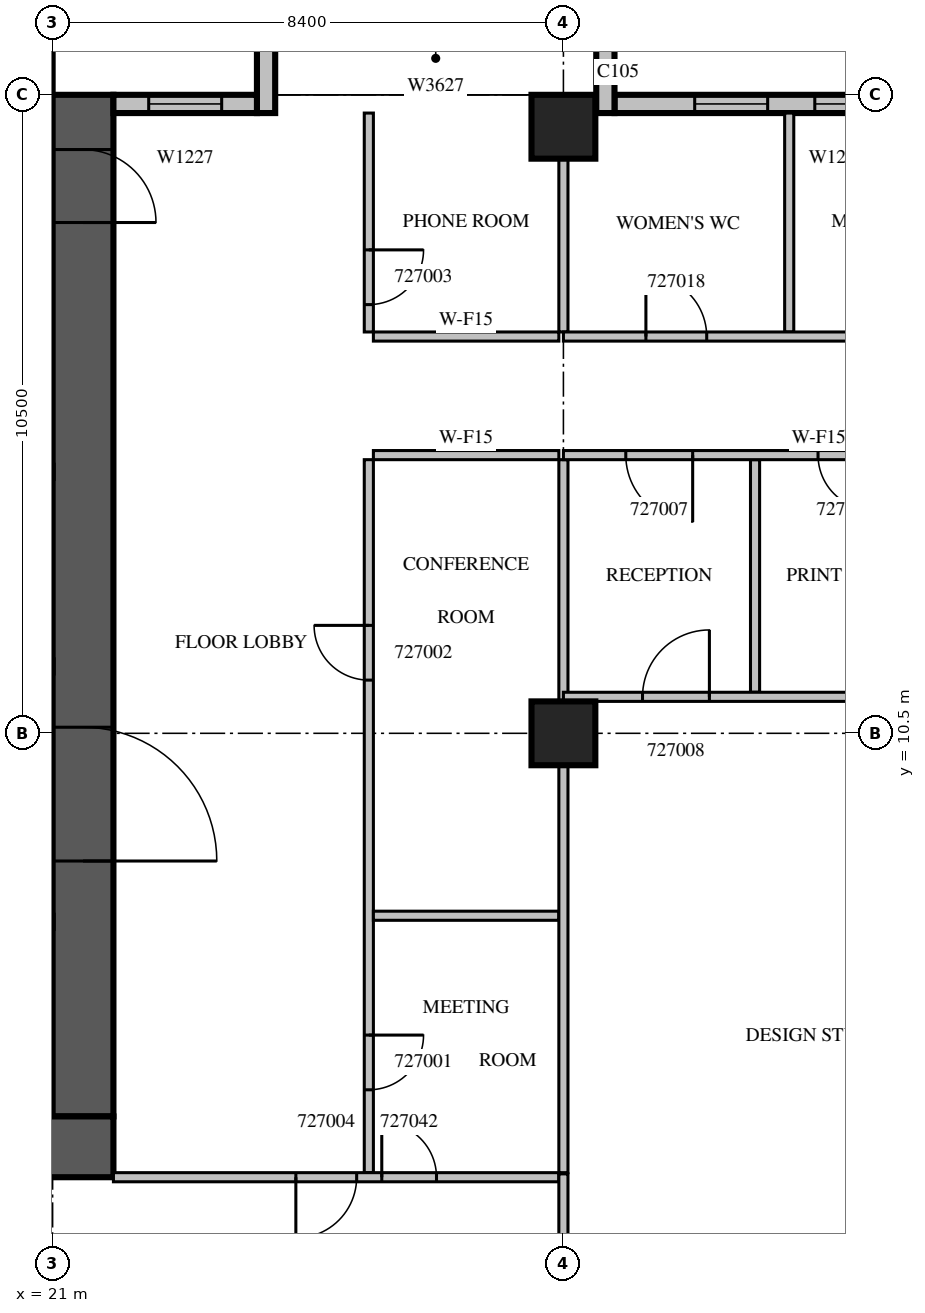
"""IFC4 building model, lengths in metres.
Left out: names, types, materials, properties, quantities, classifications, styles, units other than length and angle.
Written with IfcOpenShell. Run it as: python <this file> out.ifc"""

import sys

from ifc_helpers import new_model, si_unit, direction, frame, frame_2d, origin, origin_2d, place, context, subcontext, project, spatial, rectangle, extrude, source, transform, mapped, element, fill, save


model = new_model("IFC4")
c1 = context("Model", 3, precision=1e-05, world=origin(), true_north=direction((0.0, 1.0)))
c2 = subcontext(c1, "Body", "Model", "MODEL_VIEW")
j1 = project(units=[si_unit("LENGTHUNIT", "METRE"), si_unit("PLANEANGLEUNIT", "RADIAN")], contexts=[c1])
p1 = place(None, origin())
s1 = spatial("IfcSite", under=j1, at=p1, CompositionType="ELEMENT")
p2 = place(p1, origin())
s2 = spatial("IfcBuilding", under=s1, at=p2, CompositionType="ELEMENT")
p3 = place(p2, frame((0.0, 0.0, 124.5)))
s3 = spatial("IfcBuildingStorey", under=s2, at=p3, CompositionType="ELEMENT", Elevation=124.5)
m1 = source(origin(), c2, "Body", "SweptSolid", [
    extrude(rectangle(XDim=1.05, YDim=1.05, at=origin_2d()), origin(), (0.0, 0.0, 1.0), 4.2),
])
for number, where, z_axis, x_axis in (
    (1, (29.4, 10.5, 0.0), (0.0, 0.0, 1.0), (1.0, 0.0, 0.0)),
    (2, (29.4, 20.475, 0.0), (0.0, 0.0, 1.0), (1.0, 0.0, 0.0)),
):
    element("IfcColumn", number, at=place(p3, frame(where, z_axis=z_axis, x_axis=x_axis)), inside=s3, PredefinedType="COLUMN", context=c2, shape_type="MappedRepresentation", body=[
        mapped(m1, transform((0.0, 0.0, 0.0), scale=1.0)),
    ])
m2 = source(origin(), c2, "Body", "SweptSolid", [
    extrude(rectangle(XDim=16.8, YDim=1.0, at=frame_2d((8.4, 0.0))), origin(), (0.0, 0.0, 1.0), 4.2),
])
p4 = place(p3, frame((21.5, 4.2, 0.0), z_axis=(0.0, 0.0, 1.0), x_axis=(0.0, 1.0, 0.0)))
e3 = element("IfcWall", 3, at=p4, inside=s3, PredefinedType="SHEAR", context=c2, shape_type="MappedRepresentation", body=[
    mapped(m2, transform((0.0, 0.0, 0.0), scale=1.0)),
])
m3 = source(origin(), c2, "Body", "SweptSolid", [
    extrude(rectangle(XDim=2.2, YDim=2.1, at=frame_2d((1.1, 1.05))), frame((0.0, 0.51, 0.0), z_axis=(0.0, -1.0, 0.0), x_axis=(1.0, 0.0, 0.0)), (0.0, 0.0, 1.0), 1.02),
])
p5 = place(p4, frame((4.2, 0.0, 0.0)))
e4 = element("IfcOpeningElement", 4, at=p5, cuts=e3, PredefinedType="OPENING", context=c2, shape_type="MappedRepresentation", body=[
    mapped(m3, transform((0.0, 0.0, 0.0), scale=1.0)),
])
m4 = source(origin(), c2, "Body", "SweptSolid", [
    extrude(rectangle(XDim=1.2, YDim=2.1, at=frame_2d((0.6, 1.05))), frame((0.0, 0.51, 0.0), z_axis=(0.0, -1.0, 0.0), x_axis=(1.0, 0.0, 0.0)), (0.0, 0.0, 1.0), 1.02),
])
p6 = place(p4, frame((14.7, 0.0, 0.0)))
e5 = element("IfcOpeningElement", 5, at=p6, cuts=e3, PredefinedType="OPENING", context=c2, shape_type="MappedRepresentation", body=[
    mapped(m4, transform((0.0, 0.0, 0.0), scale=1.0)),
])
m5 = source(origin(), c2, "Body", "SweptSolid", [
    extrude(rectangle(XDim=17.8, YDim=1.0, at=frame_2d((8.9, 0.0))), origin(), (0.0, 0.0, 1.0), 4.2),
])
p7 = place(p3, frame((4.2, 3.7, 0.0), z_axis=(0.0, 0.0, 1.0), x_axis=(1.0, 0.0, 0.0)))
e6 = element("IfcWall", 6, at=p7, inside=s3, PredefinedType="SHEAR", context=c2, shape_type="MappedRepresentation", body=[
    mapped(m5, transform((0.0, 0.0, 0.0), scale=1.0)),
])
m6 = source(origin(), c2, "Body", "SweptSolid", [
    extrude(rectangle(XDim=7.035, YDim=0.3, at=frame_2d((3.518, 0.0))), origin(), (0.0, 0.0, 1.0), 3.8),
])
p8 = place(p3, frame((37.275, 20.85, 0.0), z_axis=(0.0, 0.0, 1.0), x_axis=(-1.0, 0.0, 0.0)))
e7 = element("IfcWall", 7, at=p8, inside=s3, PredefinedType="STANDARD", context=c2, shape_type="MappedRepresentation", body=[
    mapped(m6, transform((0.0, 0.0, 0.0), scale=1.0)),
])
m7 = source(origin(), c2, "Body", "SweptSolid", [
    extrude(rectangle(XDim=1.2, YDim=2.7, at=frame_2d((0.6, 1.35))), frame((0.0, 0.16, 0.0), z_axis=(0.0, -1.0, 0.0), x_axis=(1.0, 0.0, 0.0)), (0.0, 0.0, 1.0), 0.32),
])
p9 = place(p8, frame((2.541, 0.0, 0.6)))
e8 = element("IfcOpeningElement", 8, at=p9, cuts=e7, PredefinedType="OPENING", context=c2, shape_type="MappedRepresentation", body=[
    mapped(m7, transform((0.0, 0.0, 0.0), scale=1.0)),
])
p10 = place(p8, frame((4.516, 0.0, 0.6)))
e9 = element("IfcOpeningElement", 9, at=p10, cuts=e7, PredefinedType="OPENING", context=c2, shape_type="MappedRepresentation", body=[
    mapped(m7, transform((0.0, 0.0, 0.0), scale=1.0)),
])
m8 = source(origin(), c2, "Body", "SweptSolid", [
    extrude(rectangle(XDim=1.2, YDim=0.3, at=frame_2d((0.6, 0.0))), origin(), (0.0, 0.0, 1.0), 3.8),
])
for number, where, z_axis, x_axis in (
    (10, (30.09, 20.7, 0.0), (0.0, 0.0, 1.0), (0.0, 1.0, 0.0)),
    (11, (24.51, 20.7, 0.0), (0.0, 0.0, 1.0), (0.0, 1.0, 0.0)),
):
    element("IfcWall", number, at=place(p3, frame(where, z_axis=z_axis, x_axis=x_axis)), inside=s3, PredefinedType="STANDARD", context=c2, shape_type="MappedRepresentation", body=[
        mapped(m8, transform((0.0, 0.0, 0.0), scale=1.0)),
    ])
m9 = source(origin(), c2, "Body", "SweptSolid", [
    extrude(rectangle(XDim=2.36, YDim=0.3, at=frame_2d((1.18, 0.0))), origin(), (0.0, 0.0, 1.0), 3.8),
])
p11 = place(p3, frame((24.36, 20.85, 0.0), z_axis=(0.0, 0.0, 1.0), x_axis=(-1.0, 0.0, 0.0)))
e12 = element("IfcWall", 12, at=p11, inside=s3, PredefinedType="STANDARD", context=c2, shape_type="MappedRepresentation", body=[
    mapped(m9, transform((0.0, 0.0, 0.0), scale=1.0)),
])
p12 = place(p11, frame((0.58, 0.0, 0.6)))
e13 = element("IfcOpeningElement", 13, at=p12, cuts=e12, PredefinedType="OPENING", context=c2, shape_type="MappedRepresentation", body=[
    mapped(m7, transform((0.0, 0.0, 0.0), scale=1.0)),
])
m10 = source(origin(), c2, "Body", "SweptSolid", [
    extrude(rectangle(XDim=11.725, YDim=0.15, at=frame_2d((5.862, 0.0))), origin(), (0.0, 0.0, 1.0), 3.8),
])
p13 = place(p3, frame((26.2, 15.0, 0.0), z_axis=(0.0, 0.0, 1.0), x_axis=(0.0, -1.0, 0.0)))
e14 = element("IfcWall", 14, at=p13, inside=s3, PredefinedType="PARTITIONING", context=c2, shape_type="MappedRepresentation", body=[
    mapped(m10, transform((0.0, 0.0, 0.0), scale=1.0)),
])
m11 = source(origin(), c2, "Body", "SweptSolid", [
    extrude(rectangle(XDim=0.9, YDim=2.1, at=frame_2d((0.45, 1.05))), frame((0.0, 0.085, 0.0), z_axis=(0.0, -1.0, 0.0), x_axis=(1.0, 0.0, 0.0)), (0.0, 0.0, 1.0), 0.17),
])
p14 = place(p13, frame((9.463, 0.0, 0.0)))
e15 = element("IfcOpeningElement", 15, at=p14, cuts=e14, PredefinedType="OPENING", context=c2, shape_type="MappedRepresentation", body=[
    mapped(m11, transform((0.0, 0.0, 0.0), scale=1.0)),
])
p15 = place(p13, frame((2.725, 0.0, 0.0)))
e16 = element("IfcOpeningElement", 16, at=p15, cuts=e14, PredefinedType="OPENING", context=c2, shape_type="MappedRepresentation", body=[
    mapped(m11, transform((0.0, 0.0, 0.0), scale=1.0)),
])
m12 = source(origin(), c2, "Body", "SweptSolid", [
    extrude(rectangle(XDim=3.6, YDim=0.15, at=frame_2d((1.8, 0.0))), origin(), (0.0, 0.0, 1.0), 3.8),
])
p16 = place(p3, frame((26.2, 20.7, 0.0), z_axis=(0.0, 0.0, 1.0), x_axis=(0.0, -1.0, 0.0)))
e17 = element("IfcWall", 17, at=p16, inside=s3, PredefinedType="PARTITIONING", context=c2, shape_type="MappedRepresentation", body=[
    mapped(m12, transform((0.0, 0.0, 0.0), scale=1.0)),
])
p17 = place(p16, frame((2.25, 0.0, 0.0)))
e18 = element("IfcOpeningElement", 18, at=p17, cuts=e17, PredefinedType="OPENING", context=c2, shape_type="MappedRepresentation", body=[
    mapped(m11, transform((0.0, 0.0, 0.0), scale=1.0)),
])
m13 = source(origin(), c2, "Body", "SweptSolid", [
    extrude(rectangle(XDim=3.05, YDim=0.15, at=frame_2d((1.525, 0.0))), origin(), (0.0, 0.0, 1.0), 3.8),
])
for number, where, z_axis, x_axis in (
    (19, (29.325, 7.5, 0.0), (0.0, 0.0, 1.0), (-1.0, 0.0, 0.0)),
    (20, (29.325, 15.075, 0.0), (0.0, 0.0, 1.0), (-1.0, 0.0, 0.0)),
    (21, (26.275, 17.025, 0.0), (0.0, 0.0, 1.0), (1.0, 0.0, 0.0)),
):
    element("IfcWall", number, at=place(p3, frame(where, z_axis=z_axis, x_axis=x_axis)), inside=s3, PredefinedType="PARTITIONING", context=c2, shape_type="MappedRepresentation", body=[
        mapped(m13, transform((0.0, 0.0, 0.0), scale=1.0)),
    ])
m14 = source(origin(), c2, "Body", "SweptSolid", [
    extrude(rectangle(XDim=6.701, YDim=0.15, at=frame_2d((3.35, 0.0))), origin(), (0.0, 0.0, 1.0), 3.8),
])
p18 = place(p3, frame((29.4, 3.275, 0.0), z_axis=(0.0, 0.0, 1.0), x_axis=(0.0, 1.0, 0.0)))
e22 = element("IfcWall", 22, at=p18, inside=s3, PredefinedType="PARTITIONING", context=c2, shape_type="MappedRepresentation", body=[
    mapped(m14, transform((0.0, 0.0, 0.0), scale=1.0)),
])
m15 = source(origin(), c2, "Body", "SweptSolid", [
    extrude(rectangle(XDim=3.976, YDim=0.15, at=frame_2d((1.988, 0.0))), origin(), (0.0, 0.0, 1.0), 3.8),
])
p19 = place(p3, frame((29.4, 11.024, 0.0), z_axis=(0.0, 0.0, 1.0), x_axis=(0.0, 1.0, 0.0)))
e23 = element("IfcWall", 23, at=p19, inside=s3, PredefinedType="PARTITIONING", context=c2, shape_type="MappedRepresentation", body=[
    mapped(m15, transform((0.0, 0.0, 0.0), scale=1.0)),
])
m16 = source(origin(), c2, "Body", "SweptSolid", [
    extrude(rectangle(XDim=2.851, YDim=0.15, at=frame_2d((1.425, 0.0))), origin(), (0.0, 0.0, 1.0), 3.8),
])
p20 = place(p3, frame((29.4, 17.1, 0.0), z_axis=(0.0, 0.0, 1.0), x_axis=(0.0, 1.0, 0.0)))
e24 = element("IfcWall", 24, at=p20, inside=s3, PredefinedType="PARTITIONING", context=c2, shape_type="MappedRepresentation", body=[
    mapped(m16, transform((0.0, 0.0, 0.0), scale=1.0)),
])
m17 = source(origin(), c2, "Body", "SweptSolid", [
    extrude(rectangle(XDim=7.325, YDim=0.15, at=frame_2d((3.663, 0.0))), origin(), (0.0, 0.0, 1.0), 3.8),
])
p21 = place(p3, frame((22.0, 3.2, 0.0), z_axis=(0.0, 0.0, 1.0), x_axis=(1.0, 0.0, 0.0)))
e25 = element("IfcWall", 25, at=p21, inside=s3, PredefinedType="PARTITIONING", context=c2, shape_type="MappedRepresentation", body=[
    mapped(m17, transform((0.0, 0.0, 0.0), scale=1.0)),
])
m18 = source(origin(), c2, "Body", "SweptSolid", [
    extrude(rectangle(XDim=1.0, YDim=2.1, at=frame_2d((0.5, 1.05))), frame((0.0, 0.085, 0.0), z_axis=(0.0, -1.0, 0.0), x_axis=(1.0, 0.0, 0.0)), (0.0, 0.0, 1.0), 0.17),
])
p22 = place(p21, frame((3.0, 0.0, 0.0)))
e26 = element("IfcOpeningElement", 26, at=p22, cuts=e25, PredefinedType="OPENING", context=c2, shape_type="MappedRepresentation", body=[
    mapped(m18, transform((0.0, 0.0, 0.0), scale=1.0)),
])
p23 = place(p21, frame((4.413, 0.0, 0.0)))
e27 = element("IfcOpeningElement", 27, at=p23, cuts=e25, PredefinedType="OPENING", context=c2, shape_type="MappedRepresentation", body=[
    mapped(m11, transform((0.0, 0.0, 0.0), scale=1.0)),
])
m19 = source(origin(), c2, "Body", "SweptSolid", [
    extrude(rectangle(XDim=3.825, YDim=0.15, at=frame_2d((1.913, 0.0))), origin(), (0.0, 0.0, 1.0), 3.8),
])
p24 = place(p3, frame((32.551, 11.175, 0.0), z_axis=(0.0, 0.0, 1.0), x_axis=(0.0, 1.0, 0.0)))
e28 = element("IfcWall", 28, at=p24, inside=s3, PredefinedType="PARTITIONING", context=c2, shape_type="MappedRepresentation", body=[
    mapped(m19, transform((0.0, 0.0, 0.0), scale=1.0)),
])
m20 = source(origin(), c2, "Body", "SweptSolid", [
    extrude(rectangle(XDim=2.206, YDim=0.15, at=frame_2d((1.103, 0.0))), origin(), (0.0, 0.0, 1.0), 3.8),
])
p25 = place(p3, frame((29.4, 1.049, 0.0), z_axis=(0.0, 0.0, 1.0), x_axis=(0.0, 1.0, 0.0)))
e29 = element("IfcWall", 29, at=p25, inside=s3, PredefinedType="PARTITIONING", context=c2, shape_type="MappedRepresentation", body=[
    mapped(m20, transform((0.0, 0.0, 0.0), scale=1.0)),
])
m21 = source(origin(), c2, "Body", "SweptSolid", [
    extrude(rectangle(XDim=8.4, YDim=0.15, at=frame_2d((4.2, 0.0))), origin(), (0.0, 0.0, 1.0), 3.8),
])
p26 = place(p3, frame((37.8, 11.1, 0.0), z_axis=(0.0, 0.0, 1.0), x_axis=(-1.0, 0.0, 0.0)))
e30 = element("IfcWall", 30, at=p26, inside=s3, PredefinedType="PARTITIONING", context=c2, shape_type="MappedRepresentation", body=[
    mapped(m21, transform((0.0, 0.0, 0.0), scale=1.0)),
])
m22 = source(origin(), c2, "Body", "SweptSolid", [
    extrude(rectangle(XDim=1.1, YDim=2.1, at=frame_2d((0.55, 1.05))), frame((0.0, 0.085, 0.0), z_axis=(0.0, -1.0, 0.0), x_axis=(1.0, 0.0, 0.0)), (0.0, 0.0, 1.0), 0.17),
])
p27 = place(p26, frame((5.999, 0.0, 0.0)))
e31 = element("IfcOpeningElement", 31, at=p27, cuts=e30, PredefinedType="OPENING", context=c2, shape_type="MappedRepresentation", body=[
    mapped(m22, transform((0.0, 0.0, 0.0), scale=1.0)),
])
p28 = place(p3, frame((33.113, 20.7, 0.0), z_axis=(0.0, 0.0, 1.0), x_axis=(0.0, -1.0, 0.0)))
e32 = element("IfcWall", 32, at=p28, inside=s3, PredefinedType="PARTITIONING", context=c2, shape_type="MappedRepresentation", body=[
    mapped(m12, transform((0.0, 0.0, 0.0), scale=1.0)),
])
p29 = place(p3, frame((37.8, 15.075, 0.0), z_axis=(0.0, 0.0, 1.0), x_axis=(-1.0, 0.0, 0.0)))
e33 = element("IfcWall", 33, at=p29, inside=s3, PredefinedType="PARTITIONING", context=c2, shape_type="MappedRepresentation", body=[
    mapped(m21, transform((0.0, 0.0, 0.0), scale=1.0)),
])
p30 = place(p29, frame((6.274, 0.0, 0.0)))
e34 = element("IfcOpeningElement", 34, at=p30, cuts=e33, PredefinedType="OPENING", context=c2, shape_type="MappedRepresentation", body=[
    mapped(m22, transform((0.0, 0.0, 0.0), scale=1.0)),
])
p31 = place(p29, frame((3.313, 0.0, 0.0)))
e35 = element("IfcOpeningElement", 35, at=p31, cuts=e33, PredefinedType="OPENING", context=c2, shape_type="MappedRepresentation", body=[
    mapped(m11, transform((0.0, 0.0, 0.0), scale=1.0)),
])
p32 = place(p29, frame((0.689, 0.0, 0.0)))
e36 = element("IfcOpeningElement", 36, at=p32, cuts=e33, PredefinedType="OPENING", context=c2, shape_type="MappedRepresentation", body=[
    mapped(m11, transform((0.0, 0.0, 0.0), scale=1.0)),
])
m23 = source(origin(), c2, "Body", "SweptSolid", [
    extrude(rectangle(XDim=37.5, YDim=0.15, at=frame_2d((18.75, 0.0))), origin(), (0.0, 0.0, 1.0), 3.8),
])
p33 = place(p3, frame((29.4, 17.025, 0.0), z_axis=(0.0, 0.0, 1.0), x_axis=(1.0, 0.0, 0.0)))
e37 = element("IfcWall", 37, at=p33, inside=s3, PredefinedType="PARTITIONING", context=c2, shape_type="MappedRepresentation", body=[
    mapped(m23, transform((0.0, 0.0, 0.0), scale=1.0)),
])
p34 = place(p33, frame((1.357, 0.0, 0.0)))
e38 = element("IfcOpeningElement", 38, at=p34, cuts=e37, PredefinedType="OPENING", context=c2, shape_type="MappedRepresentation", body=[
    mapped(m18, transform((0.0, 0.0, 0.0), scale=1.0)),
])
p35 = place(p33, frame((4.669, 0.0, 0.0)))
e39 = element("IfcOpeningElement", 39, at=p35, cuts=e37, PredefinedType="OPENING", context=c2, shape_type="MappedRepresentation", body=[
    mapped(m18, transform((0.0, 0.0, 0.0), scale=1.0)),
])
p36 = place(p33, frame((7.012, 0.0, 0.0)))
e40 = element("IfcOpeningElement", 40, at=p36, cuts=e37, PredefinedType="OPENING", context=c2, shape_type="MappedRepresentation", body=[
    mapped(m18, transform((0.0, 0.0, 0.0), scale=1.0)),
])
p37 = place(p33, frame((10.342, 0.0, 0.0)))
e41 = element("IfcOpeningElement", 41, at=p37, cuts=e37, PredefinedType="OPENING", context=c2, shape_type="MappedRepresentation", body=[
    mapped(m11, transform((0.0, 0.0, 0.0), scale=1.0)),
])
p38 = place(p33, frame((15.09, 0.0, 0.0)))
e42 = element("IfcOpeningElement", 42, at=p38, cuts=e37, PredefinedType="OPENING", context=c2, shape_type="MappedRepresentation", body=[
    mapped(m11, transform((0.0, 0.0, 0.0), scale=1.0)),
])
p39 = place(p33, frame((19.837, 0.0, 0.0)))
e43 = element("IfcOpeningElement", 43, at=p39, cuts=e37, PredefinedType="OPENING", context=c2, shape_type="MappedRepresentation", body=[
    mapped(m11, transform((0.0, 0.0, 0.0), scale=1.0)),
])
p40 = place(p33, frame((25.12, 0.0, 0.0)))
e44 = element("IfcOpeningElement", 44, at=p40, cuts=e37, PredefinedType="OPENING", context=c2, shape_type="MappedRepresentation", body=[
    mapped(m18, transform((0.0, 0.0, 0.0), scale=1.0)),
])
p41 = place(p33, frame((30.364, 0.0, 0.0)))
e45 = element("IfcOpeningElement", 45, at=p41, cuts=e37, PredefinedType="OPENING", context=c2, shape_type="MappedRepresentation", body=[
    mapped(m11, transform((0.0, 0.0, 0.0), scale=1.0)),
])
p42 = place(p33, frame((34.871, 0.0, 0.0)))
e46 = element("IfcOpeningElement", 46, at=p42, cuts=e37, PredefinedType="OPENING", context=c2, shape_type="MappedRepresentation", body=[
    mapped(m11, transform((0.0, 0.0, 0.0), scale=1.0)),
])
m24 = source(origin(), c2, "Body", "SweptSolid", [
    extrude(rectangle(XDim=1.2, YDim=2.7, at=frame_2d((0.6, 1.35))), frame((0.0, 0.03, 0.0), z_axis=(0.0, -1.0, 0.0), x_axis=(1.0, 0.0, 0.0)), (0.0, 0.0, 1.0), 0.06),
])
p43 = place(p9, origin())
e47 = element("IfcWindow", 47, at=p43, inside=s3, PartitioningType="SINGLE_PANEL", PredefinedType="WINDOW", context=c2, shape_type="MappedRepresentation", body=[
    mapped(m24, transform((0.0, 0.0, 0.0), scale=1.0)),
])
fill(e8, e47)
p44 = place(p10, origin())
e48 = element("IfcWindow", 48, at=p44, inside=s3, PartitioningType="SINGLE_PANEL", PredefinedType="WINDOW", context=c2, shape_type="MappedRepresentation", body=[
    mapped(m24, transform((0.0, 0.0, 0.0), scale=1.0)),
])
fill(e9, e48)
p45 = place(p12, origin())
e49 = element("IfcWindow", 49, at=p45, inside=s3, PartitioningType="SINGLE_PANEL", PredefinedType="WINDOW", context=c2, shape_type="MappedRepresentation", body=[
    mapped(m24, transform((0.0, 0.0, 0.0), scale=1.0)),
])
fill(e13, e49)
m25 = source(origin(), c2, "Body", "SweptSolid", [
    extrude(rectangle(XDim=2.2, YDim=2.1, at=frame_2d((1.1, 1.05))), frame((0.0, 0.025, 0.0), z_axis=(0.0, -1.0, 0.0), x_axis=(1.0, 0.0, 0.0)), (0.0, 0.0, 1.0), 0.05),
])
p46 = place(p5, origin())
e50 = element("IfcDoor", 50, at=p46, inside=s3, OperationType="DOUBLE_DOOR_SINGLE_SWING", PredefinedType="DOOR", context=c2, shape_type="MappedRepresentation", body=[
    mapped(m25, transform((0.0, 0.0, 0.0), scale=1.0)),
])
fill(e4, e50)
m26 = source(origin(), c2, "Body", "SweptSolid", [
    extrude(rectangle(XDim=1.2, YDim=2.1, at=frame_2d((0.6, 1.05))), frame((0.0, 0.025, 0.0), z_axis=(0.0, -1.0, 0.0), x_axis=(1.0, 0.0, 0.0)), (0.0, 0.0, 1.0), 0.05),
])
p47 = place(p6, origin())
e51 = element("IfcDoor", 51, at=p47, inside=s3, OperationType="SINGLE_SWING_RIGHT", PredefinedType="DOOR", context=c2, shape_type="MappedRepresentation", body=[
    mapped(m26, transform((0.0, 0.0, 0.0), scale=1.0)),
])
fill(e5, e51)
m27 = source(origin(), c2, "Body", "SweptSolid", [
    extrude(rectangle(XDim=0.9, YDim=2.1, at=frame_2d((0.45, 1.05))), frame((0.0, 0.025, 0.0), z_axis=(0.0, -1.0, 0.0), x_axis=(1.0, 0.0, 0.0)), (0.0, 0.0, 1.0), 0.05),
])
p48 = place(p14, origin())
e52 = element("IfcDoor", 52, at=p48, inside=s3, OperationType="SINGLE_SWING_LEFT", PredefinedType="DOOR", context=c2, shape_type="MappedRepresentation", body=[
    mapped(m27, transform((0.0, 0.0, 0.0), scale=1.0)),
])
fill(e15, e52)
p49 = place(p15, origin())
e53 = element("IfcDoor", 53, at=p49, inside=s3, OperationType="SINGLE_SWING_RIGHT", PredefinedType="DOOR", context=c2, shape_type="MappedRepresentation", body=[
    mapped(m27, transform((0.0, 0.0, 0.0), scale=1.0)),
])
fill(e16, e53)
p50 = place(p17, origin())
e54 = element("IfcDoor", 54, at=p50, inside=s3, OperationType="SINGLE_SWING_LEFT", PredefinedType="DOOR", context=c2, shape_type="MappedRepresentation", body=[
    mapped(m27, transform((0.0, 0.0, 0.0), scale=1.0)),
])
fill(e18, e54)
m28 = source(origin(), c2, "Body", "SweptSolid", [
    extrude(rectangle(XDim=1.0, YDim=2.1, at=frame_2d((0.5, 1.05))), frame((0.0, 0.025, 0.0), z_axis=(0.0, -1.0, 0.0), x_axis=(1.0, 0.0, 0.0)), (0.0, 0.0, 1.0), 0.05),
])
p51 = place(p22, origin())
e55 = element("IfcDoor", 55, at=p51, inside=s3, OperationType="SINGLE_SWING_RIGHT", PredefinedType="DOOR", context=c2, shape_type="MappedRepresentation", body=[
    mapped(m28, transform((0.0, 0.0, 0.0), scale=1.0)),
])
fill(e26, e55)
m29 = source(origin(), c2, "Body", "SweptSolid", [
    extrude(rectangle(XDim=1.1, YDim=2.1, at=frame_2d((0.55, 1.05))), frame((0.0, 0.025, 0.0), z_axis=(0.0, -1.0, 0.0), x_axis=(1.0, 0.0, 0.0)), (0.0, 0.0, 1.0), 0.05),
])
p52 = place(p30, origin())
e56 = element("IfcDoor", 56, at=p52, inside=s3, OperationType="SINGLE_SWING_LEFT", PredefinedType="DOOR", context=c2, shape_type="MappedRepresentation", body=[
    mapped(m29, transform((0.0, 0.0, 0.0), scale=1.0)),
])
fill(e34, e56)
p53 = place(p27, origin())
e57 = element("IfcDoor", 57, at=p53, inside=s3, OperationType="SINGLE_SWING_RIGHT", PredefinedType="DOOR", context=c2, shape_type="MappedRepresentation", body=[
    mapped(m29, transform((0.0, 0.0, 0.0), scale=1.0)),
])
fill(e31, e57)
p54 = place(p31, origin())
e58 = element("IfcDoor", 58, at=p54, inside=s3, OperationType="SINGLE_SWING_LEFT", PredefinedType="DOOR", context=c2, shape_type="MappedRepresentation", body=[
    mapped(m27, transform((0.0, 0.0, 0.0), scale=1.0)),
])
fill(e35, e58)
p55 = place(p34, origin())
e59 = element("IfcDoor", 59, at=p55, inside=s3, OperationType="SINGLE_SWING_LEFT", PredefinedType="DOOR", context=c2, shape_type="MappedRepresentation", body=[
    mapped(m28, transform((0.0, 0.0, 0.0), scale=1.0)),
])
fill(e38, e59)
p56 = place(p23, origin())
e60 = element("IfcDoor", 60, at=p56, inside=s3, OperationType="SINGLE_SWING_LEFT", PredefinedType="DOOR", context=c2, shape_type="MappedRepresentation", body=[
    mapped(m27, transform((0.0, 0.0, 0.0), scale=1.0)),
])
fill(e27, e60)
save(model, sys.argv[1])
